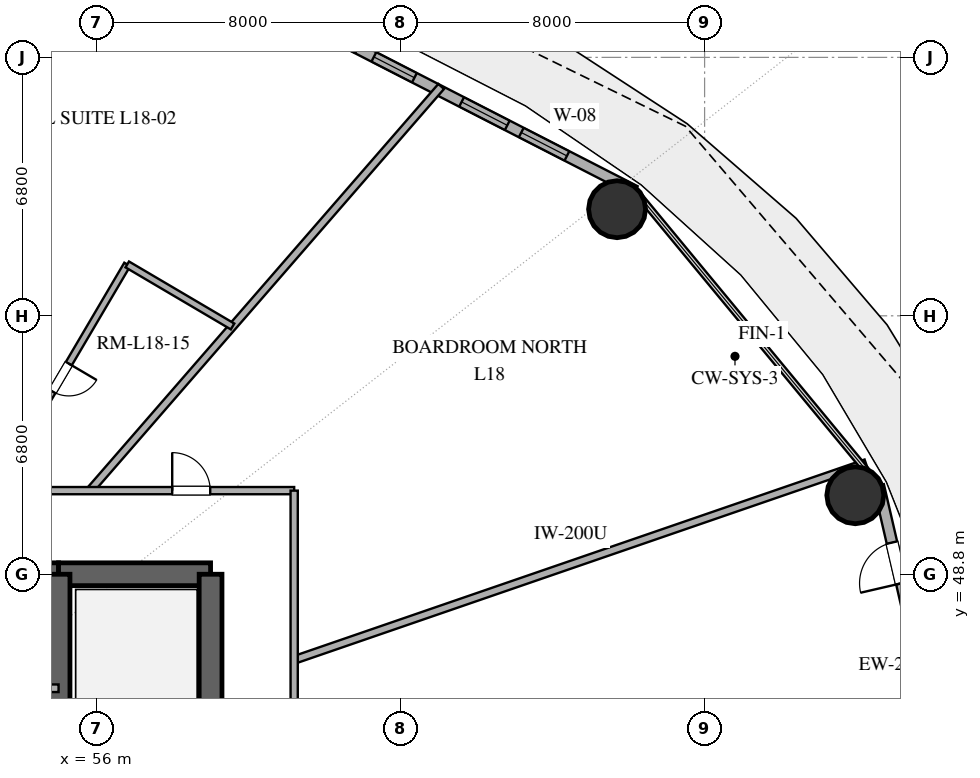
"""IFC4 building model, lengths in metres.
Left out: names, types, materials, properties, quantities, classifications, styles, units other than length and angle.
Written with IfcOpenShell. Run it as: python <this file> out.ifc"""

import sys

from ifc_helpers import new_model, si_unit, direction, frame, frame_2d, origin, origin_2d, place, context, subcontext, project, spatial, rectangle, hollow_circle, extrude, element, fill, save


model = new_model("IFC4")
c1 = context("Model", 3, precision=1e-05, world=origin(), true_north=direction((0.0, 1.0)))
c2 = subcontext(c1, "Body", "Model", "MODEL_VIEW")
j1 = project(units=[si_unit("LENGTHUNIT", "METRE"), si_unit("PLANEANGLEUNIT", "RADIAN")], contexts=[c1])
p1 = place(None, origin())
s1 = spatial("IfcSite", under=j1, at=p1, CompositionType="ELEMENT")
p2 = place(p1, origin())
s2 = spatial("IfcBuilding", under=s1, at=p2, CompositionType="ELEMENT")
p3 = place(p2, frame((0.0, 0.0, 75.0)))
s3 = spatial("IfcBuildingStorey", under=s2, at=p3, CompositionType="ELEMENT", Elevation=75.0)
p4 = place(p3, frame((41.0, 48.8, 0.0), z_axis=(0.0, 0.0, 1.0), x_axis=(1.0, 0.0, 0.0)))
e1 = element("IfcWall", 1, at=p4, inside=s3, PredefinedType="SHEAR", context=c2, shape_type="SweptSolid", body=[
    extrude(rectangle(XDim=14.0, YDim=0.6, at=frame_2d((7.0, 0.0))), origin(), (0.0, 0.0, 1.0), 3.25),
])
p5 = place(p4, frame((6.1, 0.0, 0.0)))
e2 = element("IfcOpeningElement", 2, at=p5, cuts=e1, PredefinedType="OPENING", context=c2, shape_type="SweptSolid", body=[
    extrude(rectangle(XDim=1.8, YDim=2.25, at=frame_2d((0.9, 1.125))), frame((0.0, 0.31, 0.0), z_axis=(0.0, -1.0, 0.0), x_axis=(1.0, 0.0, 0.0)), (0.0, 0.0, 1.0), 0.62),
])
p6 = place(p3, frame((55.0, 48.8, 0.0), z_axis=(0.0, 0.0, 1.0), x_axis=(1.0, 0.0, 0.0)))
e3 = element("IfcWall", 3, at=p6, inside=s3, PredefinedType="SHEAR", context=c2, shape_type="SweptSolid", body=[
    extrude(rectangle(XDim=4.0, YDim=0.6, at=frame_2d((2.0, 0.0))), origin(), (0.0, 0.0, 1.0), 3.25),
])
p7 = place(p3, frame((59.0, 35.2, 0.0), z_axis=(0.0, 0.0, 1.0), x_axis=(0.0, 1.0, 0.0)))
e4 = element("IfcWall", 4, at=p7, inside=s3, PredefinedType="SHEAR", context=c2, shape_type="SweptSolid", body=[
    extrude(rectangle(XDim=13.6, YDim=0.6, at=frame_2d((6.8, 0.0))), origin(), (0.0, 0.0, 1.0), 3.25),
])
p8 = place(p7, frame((1.5, 0.0, 0.0)))
e5 = element("IfcOpeningElement", 5, at=p8, cuts=e4, PredefinedType="OPENING", context=c2, shape_type="SweptSolid", body=[
    extrude(rectangle(XDim=1.2, YDim=2.15, at=frame_2d((0.6, 1.075))), frame((0.0, 0.31, 0.0), z_axis=(0.0, -1.0, 0.0), x_axis=(1.0, 0.0, 0.0)), (0.0, 0.0, 1.0), 0.62),
])
p9 = place(p3, frame((55.0, 35.2, 0.0), z_axis=(0.0, 0.0, 1.0), x_axis=(0.0, 1.0, 0.0)))
e6 = element("IfcWall", 6, at=p9, inside=s3, PredefinedType="SHEAR", context=c2, shape_type="SweptSolid", body=[
    extrude(rectangle(XDim=13.6, YDim=0.6, at=frame_2d((6.8, 0.0))), origin(), (0.0, 0.0, 1.0), 3.25),
])
p10 = place(p9, frame((1.15, 0.0, 0.0)))
e7 = element("IfcOpeningElement", 7, at=p10, cuts=e6, PredefinedType="OPENING", context=c2, shape_type="SweptSolid", body=[
    extrude(rectangle(XDim=1.1, YDim=2.2, at=frame_2d((0.55, 1.1))), frame((0.0, 0.31, 0.0), z_axis=(0.0, -1.0, 0.0), x_axis=(1.0, 0.0, 0.0)), (0.0, 0.0, 1.0), 0.62),
])
for number, where, z_axis, x_axis in (
    (8, (75.966, 50.878, 0.0), (0.0, 0.0, 1.0), (1.0, 0.0, 0.0)),
    (9, (69.697, 58.405, 0.0), (0.0, 0.0, 1.0), (1.0, 0.0, 0.0)),
):
    element("IfcColumn", number, at=place(p3, frame(where, z_axis=z_axis, x_axis=x_axis)), inside=s3, PredefinedType="COLUMN", context=c2, shape_type="SweptSolid", body=[
        extrude(hollow_circle(Radius=0.75, WallThickness=0.04, at=origin_2d()), origin(), (0.0, 0.0, 1.0), 3.25),
    ])
p11 = place(p3, frame((78.696, 42.0, 0.0), z_axis=(0.0, 0.0, 1.0), x_axis=(-0.225454452941, 0.974253709076, 0.0)))
e10 = element("IfcWall", 10, at=p11, inside=s3, PredefinedType="SOLIDWALL", context=c2, shape_type="SweptSolid", body=[
    extrude(rectangle(XDim=9.38, YDim=0.28, at=frame_2d((4.69, 0.0))), origin(), (0.0, 0.0, 1.0), 3.25),
])
p12 = place(p11, frame((6.735, 0.0, 0.0)))
e11 = element("IfcOpeningElement", 11, at=p12, cuts=e10, PredefinedType="OPENING", context=c2, shape_type="SweptSolid", body=[
    extrude(rectangle(XDim=1.1, YDim=2.25, at=frame_2d((0.55, 1.125))), frame((0.0, 0.15, 0.0), z_axis=(0.0, -1.0, 0.0), x_axis=(1.0, 0.0, 0.0)), (0.0, 0.0, 1.0), 0.3),
])
p13 = place(p3, frame((70.174, 58.886, 0.0), z_axis=(0.0, 0.0, 1.0), x_axis=(-0.889853976658, 0.456245438581, 0.0)))
e12 = element("IfcWall", 12, at=p13, inside=s3, PredefinedType="SOLIDWALL", context=c2, shape_type="SweptSolid", body=[
    extrude(rectangle(XDim=11.346, YDim=0.28, at=frame_2d((5.673, 0.0))), origin(), (0.0, 0.0, 1.0), 3.25),
])
p14 = place(p13, frame((2.02, 0.0, 0.85)))
e13 = element("IfcOpeningElement", 13, at=p14, cuts=e12, PredefinedType="OPENING", context=c2, shape_type="SweptSolid", body=[
    extrude(rectangle(XDim=1.35, YDim=1.8, at=frame_2d((0.675, 0.9))), frame((0.0, 0.15, 0.0), z_axis=(0.0, -1.0, 0.0), x_axis=(1.0, 0.0, 0.0)), (0.0, 0.0, 1.0), 0.3),
])
p15 = place(p13, frame((3.784, 0.0, 0.85)))
e14 = element("IfcOpeningElement", 14, at=p15, cuts=e12, PredefinedType="OPENING", context=c2, shape_type="SweptSolid", body=[
    extrude(rectangle(XDim=1.35, YDim=1.8, at=frame_2d((0.675, 0.9))), frame((0.0, 0.15, 0.0), z_axis=(0.0, -1.0, 0.0), x_axis=(1.0, 0.0, 0.0)), (0.0, 0.0, 1.0), 0.3),
])
p16 = place(p13, frame((6.529, 0.0, 0.85)))
e15 = element("IfcOpeningElement", 15, at=p16, cuts=e12, PredefinedType="OPENING", context=c2, shape_type="SweptSolid", body=[
    extrude(rectangle(XDim=1.2, YDim=1.8, at=frame_2d((0.6, 0.9))), frame((0.0, 0.15, 0.0), z_axis=(0.0, -1.0, 0.0), x_axis=(1.0, 0.0, 0.0)), (0.0, 0.0, 1.0), 0.3),
])
p17 = place(p13, frame((8.21, 0.0, 0.85)))
e16 = element("IfcOpeningElement", 16, at=p17, cuts=e12, PredefinedType="OPENING", context=c2, shape_type="SweptSolid", body=[
    extrude(rectangle(XDim=1.2, YDim=1.8, at=frame_2d((0.6, 0.9))), frame((0.0, 0.15, 0.0), z_axis=(0.0, -1.0, 0.0), x_axis=(1.0, 0.0, 0.0)), (0.0, 0.0, 1.0), 0.3),
])
p18 = place(p3, frame((52.05, 45.8, 0.0), z_axis=(0.0, 0.0, 1.0), x_axis=(1.0, 0.0, 0.0)))
e17 = element("IfcWall", 17, at=p18, inside=s3, PredefinedType="SOLIDWALL", context=c2, shape_type="SweptSolid", body=[
    extrude(rectangle(XDim=2.95, YDim=0.2, at=frame_2d((1.475, 0.0))), origin(), (0.0, 0.0, 1.0), 2.61),
])
p19 = place(p3, frame((61.2, 46.545, 0.0), z_axis=(0.0, 0.0, 1.0), x_axis=(0.945518845989, 0.325567369186, 0.0)))
e18 = element("IfcWall", 18, at=p19, inside=s3, PredefinedType="PARTITIONING", context=c2, shape_type="SweptSolid", body=[
    extrude(rectangle(XDim=15.909, YDim=0.2, at=frame_2d((7.955, 0.0))), origin(), (0.0, 0.0, 1.0), 2.61),
])
p20 = place(p3, frame((55.823, 51.0, 0.0), z_axis=(0.0, 0.0, 1.0), x_axis=(0.656066321773, 0.754703240641, 0.0)))
e19 = element("IfcWall", 19, at=p20, inside=s3, PredefinedType="PARTITIONING", context=c2, shape_type="SweptSolid", body=[
    extrude(rectangle(XDim=14.091, YDim=0.2, at=frame_2d((7.045, 0.0))), origin(), (0.0, 0.0, 1.0), 2.61),
])
p21 = place(p3, frame((56.807, 56.952, 0.0), z_axis=(0.0, 0.0, 1.0), x_axis=(-0.507529744585, -0.861634236995, 0.0)))
e20 = element("IfcWall", 20, at=p21, inside=s3, PredefinedType="PLUMBINGWALL", context=c2, shape_type="SweptSolid", body=[
    extrude(rectangle(XDim=6.908, YDim=0.18, at=frame_2d((3.454, 0.0))), origin(), (0.0, 0.0, 1.0), 2.61),
])
p22 = place(p21, frame((3.029, 0.0, 0.0)))
e21 = element("IfcOpeningElement", 21, at=p22, cuts=e20, PredefinedType="OPENING", context=c2, shape_type="SweptSolid", body=[
    extrude(rectangle(XDim=0.85, YDim=2.1, at=frame_2d((0.425, 1.05))), frame((0.0, 0.1, 0.0), z_axis=(0.0, -1.0, 0.0), x_axis=(1.0, 0.0, 0.0)), (0.0, 0.0, 1.0), 0.2),
])
p23 = place(p3, frame((53.264, 51.0, 0.0), z_axis=(0.0, 0.0, 1.0), x_axis=(1.0, 0.0, 0.0)))
e22 = element("IfcWall", 22, at=p23, inside=s3, PredefinedType="PARTITIONING", context=c2, shape_type="SweptSolid", body=[
    extrude(rectangle(XDim=7.936, YDim=0.19, at=frame_2d((3.968, 0.0))), origin(), (0.0, 0.0, 1.0), 2.61),
])
p24 = place(p23, frame((4.726, 0.0, 0.0)))
e23 = element("IfcOpeningElement", 23, at=p24, cuts=e22, PredefinedType="OPENING", context=c2, shape_type="SweptSolid", body=[
    extrude(rectangle(XDim=1.0, YDim=2.2, at=frame_2d((0.5, 1.1))), frame((0.0, 0.105, 0.0), z_axis=(0.0, -1.0, 0.0), x_axis=(1.0, 0.0, 0.0)), (0.0, 0.0, 1.0), 0.21),
])
p25 = place(p3, frame((61.2, 51.0, 0.0), z_axis=(0.0, 0.0, 1.0), x_axis=(0.0, -1.0, 0.0)))
e24 = element("IfcWall", 24, at=p25, inside=s3, PredefinedType="PARTITIONING", context=c2, shape_type="SweptSolid", body=[
    extrude(rectangle(XDim=9.147, YDim=0.19, at=frame_2d((4.574, 0.0))), origin(), (0.0, 0.0, 1.0), 2.61),
])
p26 = place(p25, frame((6.309, 0.0, 0.0)))
e25 = element("IfcOpeningElement", 25, at=p26, cuts=e24, PredefinedType="OPENING", context=c2, shape_type="SweptSolid", body=[
    extrude(rectangle(XDim=0.95, YDim=2.15, at=frame_2d((0.475, 1.075))), frame((0.0, 0.105, 0.0), z_axis=(0.0, -1.0, 0.0), x_axis=(1.0, 0.0, 0.0)), (0.0, 0.0, 1.0), 0.21),
])
p27 = place(p3, frame((59.579, 55.32, 0.0), z_axis=(0.0, 0.0, 1.0), x_axis=(-0.861637458593, 0.507524275232, 0.0)))
e26 = element("IfcWall", 26, at=p27, inside=s3, PredefinedType="PLUMBINGWALL", context=c2, shape_type="SweptSolid", body=[
    extrude(rectangle(XDim=3.216, YDim=0.18, at=frame_2d((1.608, 0.0))), origin(), (0.0, 0.0, 1.0), 2.61),
])
p28 = place(p12, origin())
e27 = element("IfcDoor", 27, at=p28, inside=s3, OperationType="SINGLE_SWING_LEFT", PredefinedType="DOOR", context=c2, shape_type="SweptSolid", body=[
    extrude(rectangle(XDim=1.1, YDim=2.25, at=frame_2d((0.55, 1.125))), frame((0.0, 0.025, 0.0), z_axis=(0.0, -1.0, 0.0), x_axis=(1.0, 0.0, 0.0)), (0.0, 0.0, 1.0), 0.05),
])
fill(e11, e27)
p29 = place(p14, origin())
e28 = element("IfcWindow", 28, at=p29, inside=s3, PartitioningType="SINGLE_PANEL", PredefinedType="WINDOW", context=c2, shape_type="SweptSolid", body=[
    extrude(rectangle(XDim=1.35, YDim=1.8, at=frame_2d((0.675, 0.9))), frame((0.0, 0.03, 0.0), z_axis=(0.0, -1.0, 0.0), x_axis=(1.0, 0.0, 0.0)), (0.0, 0.0, 1.0), 0.06),
])
fill(e13, e28)
p30 = place(p15, origin())
e29 = element("IfcWindow", 29, at=p30, inside=s3, PartitioningType="SINGLE_PANEL", PredefinedType="WINDOW", context=c2, shape_type="SweptSolid", body=[
    extrude(rectangle(XDim=1.35, YDim=1.8, at=frame_2d((0.675, 0.9))), frame((0.0, 0.03, 0.0), z_axis=(0.0, -1.0, 0.0), x_axis=(1.0, 0.0, 0.0)), (0.0, 0.0, 1.0), 0.06),
])
fill(e14, e29)
p31 = place(p16, origin())
e30 = element("IfcWindow", 30, at=p31, inside=s3, PartitioningType="SINGLE_PANEL", PredefinedType="WINDOW", context=c2, shape_type="SweptSolid", body=[
    extrude(rectangle(XDim=1.2, YDim=1.8, at=frame_2d((0.6, 0.9))), frame((0.0, 0.03, 0.0), z_axis=(0.0, -1.0, 0.0), x_axis=(1.0, 0.0, 0.0)), (0.0, 0.0, 1.0), 0.06),
])
fill(e15, e30)
p32 = place(p22, origin())
e31 = element("IfcDoor", 31, at=p32, inside=s3, OperationType="SINGLE_SWING_LEFT", PredefinedType="DOOR", context=c2, shape_type="SweptSolid", body=[
    extrude(rectangle(XDim=0.85, YDim=2.1, at=frame_2d((0.425, 1.05))), frame((0.0, 0.025, 0.0), z_axis=(0.0, -1.0, 0.0), x_axis=(1.0, 0.0, 0.0)), (0.0, 0.0, 1.0), 0.05),
])
fill(e21, e31)
p33 = place(p24, origin())
e32 = element("IfcDoor", 32, at=p33, inside=s3, OperationType="SINGLE_SWING_LEFT", PredefinedType="DOOR", context=c2, shape_type="SweptSolid", body=[
    extrude(rectangle(XDim=1.0, YDim=2.2, at=frame_2d((0.5, 1.1))), frame((0.0, 0.025, 0.0), z_axis=(0.0, -1.0, 0.0), x_axis=(1.0, 0.0, 0.0)), (0.0, 0.0, 1.0), 0.05),
])
fill(e23, e32)
save(model, sys.argv[1])
